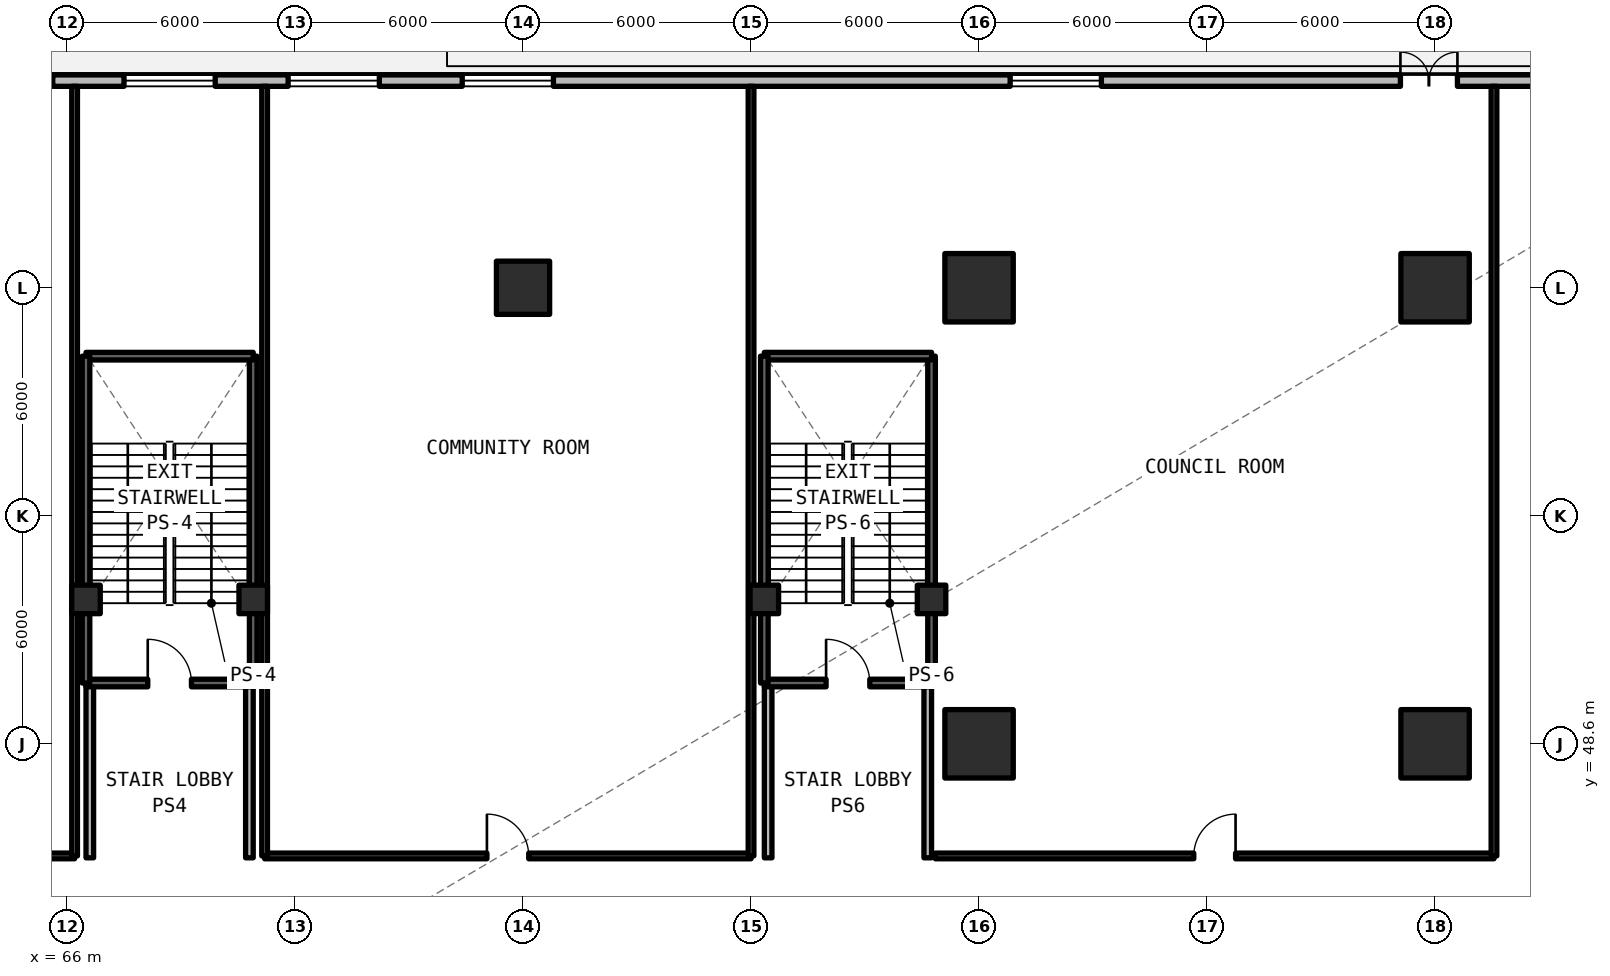
"""IFC4 building model, lengths in metres.
Left out: names, types, materials, properties, quantities, classifications, styles, units other than length and angle.
Written with IfcOpenShell. Run it as: python <this file> out.ifc"""

import sys

from ifc_helpers import new_model, si_unit, direction, frame, frame_2d, origin, origin_2d, place, context, subcontext, project, spatial, rectangle, circle, extrude, element, fill, save


model = new_model("IFC4")
c1 = context("Model", 3, precision=1e-05, world=origin(), true_north=direction((0.0, 1.0)))
c2 = subcontext(c1, "Body", "Model", "MODEL_VIEW")
j1 = project(units=[si_unit("LENGTHUNIT", "METRE"), si_unit("PLANEANGLEUNIT", "RADIAN")], contexts=[c1])
p1 = place(None, origin())
s1 = spatial("IfcSite", under=j1, at=p1, CompositionType="ELEMENT")
p2 = place(p1, origin())
s2 = spatial("IfcBuilding", under=s1, at=p2, CompositionType="ELEMENT")
p3 = place(p2, frame((0.0, 0.0, 4.95)))
s3 = spatial("IfcBuildingStorey", under=s2, at=p3, CompositionType="ELEMENT", Elevation=4.95)
p4 = place(p3, frame((78.0, 60.6, 0.0), z_axis=(0.0, 0.0, 1.0), x_axis=(1.0, 0.0, 0.0)))
e1 = element("IfcColumn", 1, at=p4, inside=s3, PredefinedType="COLUMN", context=c2, shape_type="SweptSolid", body=[
    extrude(circle(Radius=0.7, at=origin_2d()), origin(), (0.0, 0.0, 1.0), 4.95),
])
for number, where, z_axis, x_axis in (
    (2, (90.0, 60.6, 0.0), (0.0, 0.0, 1.0), (1.0, 0.0, 0.0)),
    (3, (102.0, 60.6, 0.0), (0.0, 0.0, 1.0), (1.0, 0.0, 0.0)),
    (4, (90.0, 48.6, 0.0), (0.0, 0.0, 1.0), (1.0, 0.0, 0.0)),
    (5, (102.0, 48.6, 0.0), (0.0, 0.0, 1.0), (1.0, 0.0, 0.0)),
):
    element("IfcColumn", number, at=place(p3, frame(where, z_axis=z_axis, x_axis=x_axis)), inside=s3, PredefinedType="COLUMN", context=c2, shape_type="SweptSolid", body=[
        extrude(rectangle(XDim=1.8, YDim=1.8, at=origin_2d()), origin(), (0.0, 0.0, 1.0), 4.95),
    ])
for number, where, z_axis, x_axis in (
    (6, (66.5, 52.4, 0.0), (0.0, 0.0, 1.0), (1.0, 0.0, 0.0)),
    (7, (70.9, 52.4, 0.0), (0.0, 0.0, 1.0), (1.0, 0.0, 0.0)),
    (8, (84.35, 52.4, 0.0), (0.0, 0.0, 1.0), (1.0, 0.0, 0.0)),
    (9, (88.75, 52.4, 0.0), (0.0, 0.0, 1.0), (1.0, 0.0, 0.0)),
):
    element("IfcColumn", number, at=place(p3, frame(where, z_axis=z_axis, x_axis=x_axis)), inside=s3, PredefinedType="COLUMN", context=c2, shape_type="SweptSolid", body=[
        extrude(rectangle(XDim=0.75, YDim=0.75, at=origin_2d()), origin(), (0.0, 0.0, 1.0), 4.95),
    ])
p5 = place(p3, frame((110.338, 66.05, 0.0), z_axis=(0.0, 0.0, 1.0), x_axis=(-1.0, 0.0, 0.0)))
e10 = element("IfcWall", 10, at=p5, inside=s3, PredefinedType="SOLIDWALL", context=c2, shape_type="SweptSolid", body=[
    extrude(rectangle(XDim=46.138, YDim=0.3, at=frame_2d((23.069, 0.0))), origin(), (0.0, 0.0, 1.0), 4.67),
])
p6 = place(p5, frame((7.75, 0.0, 0.0)))
e11 = element("IfcOpeningElement", 11, at=p6, cuts=e10, PredefinedType="OPENING", context=c2, shape_type="SweptSolid", body=[
    extrude(rectangle(XDim=1.5, YDim=2.2, at=frame_2d((0.75, 1.1))), frame((0.0, 0.16, 0.0), z_axis=(0.0, -1.0, 0.0), x_axis=(1.0, 0.0, 0.0)), (0.0, 0.0, 1.0), 0.32),
])
p7 = place(p5, frame((44.713, 0.0, 0.78)))
e12 = element("IfcOpeningElement", 12, at=p7, cuts=e10, PredefinedType="OPENING", context=c2, shape_type="SweptSolid", body=[
    extrude(rectangle(XDim=0.85, YDim=1.65, at=frame_2d((0.425, 0.825))), frame((0.0, 0.16, 0.0), z_axis=(0.0, -1.0, 0.0), x_axis=(1.0, 0.0, 0.0)), (0.0, 0.0, 1.0), 0.32),
])
p8 = place(p5, frame((31.538, 0.0, 0.78)))
e13 = element("IfcOpeningElement", 13, at=p8, cuts=e10, PredefinedType="OPENING", context=c2, shape_type="SweptSolid", body=[
    extrude(rectangle(XDim=2.4, YDim=1.66, at=frame_2d((1.2, 0.83))), frame((0.0, 0.16, 0.0), z_axis=(0.0, -1.0, 0.0), x_axis=(1.0, 0.0, 0.0)), (0.0, 0.0, 1.0), 0.32),
])
p9 = place(p5, frame((2.194, 0.0, 0.78)))
e14 = element("IfcOpeningElement", 14, at=p9, cuts=e10, PredefinedType="OPENING", context=c2, shape_type="SweptSolid", body=[
    extrude(rectangle(XDim=2.4, YDim=1.66, at=frame_2d((1.2, 0.83))), frame((0.0, 0.16, 0.0), z_axis=(0.0, -1.0, 0.0), x_axis=(1.0, 0.0, 0.0)), (0.0, 0.0, 1.0), 0.32),
])
p10 = place(p5, frame((40.438, 0.0, 0.78)))
e15 = element("IfcOpeningElement", 15, at=p10, cuts=e10, PredefinedType="OPENING", context=c2, shape_type="SweptSolid", body=[
    extrude(rectangle(XDim=2.4, YDim=1.66, at=frame_2d((1.2, 0.83))), frame((0.0, 0.16, 0.0), z_axis=(0.0, -1.0, 0.0), x_axis=(1.0, 0.0, 0.0)), (0.0, 0.0, 1.0), 0.32),
])
p11 = place(p5, frame((17.119, 0.0, 0.78)))
e16 = element("IfcOpeningElement", 16, at=p11, cuts=e10, PredefinedType="OPENING", context=c2, shape_type="SweptSolid", body=[
    extrude(rectangle(XDim=2.4, YDim=1.66, at=frame_2d((1.2, 0.83))), frame((0.0, 0.16, 0.0), z_axis=(0.0, -1.0, 0.0), x_axis=(1.0, 0.0, 0.0)), (0.0, 0.0, 1.0), 0.32),
])
p12 = place(p5, frame((36.119, 0.0, 0.78)))
e17 = element("IfcOpeningElement", 17, at=p12, cuts=e10, PredefinedType="OPENING", context=c2, shape_type="SweptSolid", body=[
    extrude(rectangle(XDim=2.4, YDim=1.66, at=frame_2d((1.2, 0.83))), frame((0.0, 0.16, 0.0), z_axis=(0.0, -1.0, 0.0), x_axis=(1.0, 0.0, 0.0)), (0.0, 0.0, 1.0), 0.32),
])
for number, where, z_axis, x_axis in (
    (18, (66.6, 45.6, 0.0), (0.0, 0.0, 1.0), (0.0, 1.0, 0.0)),
    (19, (70.8, 45.6, 0.0), (0.0, 0.0, 1.0), (0.0, 1.0, 0.0)),
    (20, (84.45, 45.6, 0.0), (0.0, 0.0, 1.0), (0.0, 1.0, 0.0)),
    (21, (88.65, 45.6, 0.0), (0.0, 0.0, 1.0), (0.0, 1.0, 0.0)),
):
    element("IfcWall", number, at=place(p3, frame(where, z_axis=z_axis, x_axis=x_axis)), inside=s3, PredefinedType="SOLIDWALL", context=c2, shape_type="SweptSolid", body=[
        extrude(rectangle(XDim=4.6, YDim=0.2, at=frame_2d((2.3, 0.0))), origin(), (0.0, 0.0, 1.0), 3.89),
    ])
p13 = place(p3, frame((30.2, 45.65, 0.0), z_axis=(0.0, 0.0, 1.0), x_axis=(1.0, 0.0, 0.0)))
e22 = element("IfcWall", 22, at=p13, inside=s3, PredefinedType="SOLIDWALL", context=c2, shape_type="SweptSolid", body=[
    extrude(rectangle(XDim=36.0, YDim=0.15, at=frame_2d((18.0, 0.0))), origin(), (0.0, 0.0, 1.0), 3.89),
])
p14 = place(p13, frame((17.3, 0.0, 0.0)))
e23 = element("IfcOpeningElement", 23, at=p14, cuts=e22, PredefinedType="OPENING", context=c2, shape_type="SweptSolid", body=[
    extrude(rectangle(XDim=1.4, YDim=2.15, at=frame_2d((0.7, 1.075))), frame((0.0, 0.085, 0.0), z_axis=(0.0, -1.0, 0.0), x_axis=(1.0, 0.0, 0.0)), (0.0, 0.0, 1.0), 0.17),
])
p15 = place(p3, frame((66.2, 45.65, 0.0), z_axis=(0.0, 0.0, 1.0), x_axis=(0.0, 1.0, 0.0)))
e24 = element("IfcWall", 24, at=p15, inside=s3, PredefinedType="SOLIDWALL", context=c2, shape_type="SweptSolid", body=[
    extrude(rectangle(XDim=20.25, YDim=0.15, at=frame_2d((10.125, 0.0))), origin(), (0.0, 0.0, 1.0), 3.89),
])
p16 = place(p3, frame((71.2, 45.65, 0.0), z_axis=(0.0, 0.0, 1.0), x_axis=(1.0, 0.0, 0.0)))
e25 = element("IfcWall", 25, at=p16, inside=s3, PredefinedType="SOLIDWALL", context=c2, shape_type="SweptSolid", body=[
    extrude(rectangle(XDim=12.8, YDim=0.15, at=frame_2d((6.4, 0.0))), origin(), (0.0, 0.0, 1.0), 3.89),
])
p17 = place(p16, frame((5.85, 0.0, 0.0)))
e26 = element("IfcOpeningElement", 26, at=p17, cuts=e25, PredefinedType="OPENING", context=c2, shape_type="SweptSolid", body=[
    extrude(rectangle(XDim=1.1, YDim=2.15, at=frame_2d((0.55, 1.075))), frame((0.0, 0.085, 0.0), z_axis=(0.0, -1.0, 0.0), x_axis=(1.0, 0.0, 0.0)), (0.0, 0.0, 1.0), 0.17),
])
for number, where, z_axis, x_axis in (
    (27, (71.2, 45.65, 0.0), (0.0, 0.0, 1.0), (0.0, 1.0, 0.0)),
    (28, (84.0, 45.65, 0.0), (0.0, 0.0, 1.0), (0.0, 1.0, 0.0)),
):
    element("IfcWall", number, at=place(p3, frame(where, z_axis=z_axis, x_axis=x_axis)), inside=s3, PredefinedType="SOLIDWALL", context=c2, shape_type="SweptSolid", body=[
        extrude(rectangle(XDim=20.25, YDim=0.15, at=frame_2d((10.125, 0.0))), origin(), (0.0, 0.0, 1.0), 3.89),
    ])
p18 = place(p3, frame((88.85, 45.65, 0.0), z_axis=(0.0, 0.0, 1.0), x_axis=(1.0, 0.0, 0.0)))
e29 = element("IfcWall", 29, at=p18, inside=s3, PredefinedType="SOLIDWALL", context=c2, shape_type="SweptSolid", body=[
    extrude(rectangle(XDim=14.7, YDim=0.15, at=frame_2d((7.35, 0.0))), origin(), (0.0, 0.0, 1.0), 3.89),
])
p19 = place(p18, frame((6.8, 0.0, 0.0)))
e30 = element("IfcOpeningElement", 30, at=p19, cuts=e29, PredefinedType="OPENING", context=c2, shape_type="SweptSolid", body=[
    extrude(rectangle(XDim=1.1, YDim=2.15, at=frame_2d((0.55, 1.075))), frame((0.0, 0.085, 0.0), z_axis=(0.0, -1.0, 0.0), x_axis=(1.0, 0.0, 0.0)), (0.0, 0.0, 1.0), 0.17),
])
p20 = place(p3, frame((103.55, 45.65, 0.0), z_axis=(0.0, 0.0, 1.0), x_axis=(0.0, 1.0, 0.0)))
e31 = element("IfcWall", 31, at=p20, inside=s3, PredefinedType="SOLIDWALL", context=c2, shape_type="SweptSolid", body=[
    extrude(rectangle(XDim=20.25, YDim=0.15, at=frame_2d((10.125, 0.0))), origin(), (0.0, 0.0, 1.0), 3.89),
])
p21 = place(p3, frame((66.5, 50.2, 0.0), z_axis=(0.0, 0.0, 1.0), x_axis=(1.0, 0.0, 0.0)))
e32 = element("IfcWall", 32, at=p21, inside=s3, PredefinedType="SOLIDWALL", context=c2, shape_type="SweptSolid", body=[
    extrude(rectangle(XDim=4.4, YDim=0.2, at=frame_2d((2.2, 0.0))), origin(), (0.0, 0.0, 1.0), 4.95),
])
p22 = place(p21, frame((1.625, 0.0, 0.0)))
e33 = element("IfcOpeningElement", 33, at=p22, cuts=e32, PredefinedType="OPENING", context=c2, shape_type="SweptSolid", body=[
    extrude(rectangle(XDim=1.15, YDim=2.15, at=frame_2d((0.575, 1.075))), frame((0.0, 0.11, 0.0), z_axis=(0.0, -1.0, 0.0), x_axis=(1.0, 0.0, 0.0)), (0.0, 0.0, 1.0), 0.22),
])
p23 = place(p3, frame((70.9, 50.2, 0.0), z_axis=(0.0, 0.0, 1.0), x_axis=(0.0, 1.0, 0.0)))
e34 = element("IfcWall", 34, at=p23, inside=s3, PredefinedType="SOLIDWALL", context=c2, shape_type="SweptSolid", body=[
    extrude(rectangle(XDim=8.6, YDim=0.2, at=frame_2d((4.3, 0.0))), origin(), (0.0, 0.0, 1.0), 4.95),
])
p24 = place(p3, frame((70.9, 58.8, 0.0), z_axis=(0.0, 0.0, 1.0), x_axis=(-1.0, 0.0, 0.0)))
e35 = element("IfcWall", 35, at=p24, inside=s3, PredefinedType="SOLIDWALL", context=c2, shape_type="SweptSolid", body=[
    extrude(rectangle(XDim=4.4, YDim=0.2, at=frame_2d((2.2, 0.0))), origin(), (0.0, 0.0, 1.0), 4.95),
])
p25 = place(p3, frame((66.5, 58.8, 0.0), z_axis=(0.0, 0.0, 1.0), x_axis=(0.0, -1.0, 0.0)))
e36 = element("IfcWall", 36, at=p25, inside=s3, PredefinedType="SOLIDWALL", context=c2, shape_type="SweptSolid", body=[
    extrude(rectangle(XDim=8.6, YDim=0.2, at=frame_2d((4.3, 0.0))), origin(), (0.0, 0.0, 1.0), 4.95),
])
p26 = place(p3, frame((84.35, 50.2, 0.0), z_axis=(0.0, 0.0, 1.0), x_axis=(1.0, 0.0, 0.0)))
e37 = element("IfcWall", 37, at=p26, inside=s3, PredefinedType="SOLIDWALL", context=c2, shape_type="SweptSolid", body=[
    extrude(rectangle(XDim=4.4, YDim=0.2, at=frame_2d((2.2, 0.0))), origin(), (0.0, 0.0, 1.0), 4.95),
])
p27 = place(p26, frame((1.625, 0.0, 0.0)))
e38 = element("IfcOpeningElement", 38, at=p27, cuts=e37, PredefinedType="OPENING", context=c2, shape_type="SweptSolid", body=[
    extrude(rectangle(XDim=1.15, YDim=2.15, at=frame_2d((0.575, 1.075))), frame((0.0, 0.11, 0.0), z_axis=(0.0, -1.0, 0.0), x_axis=(1.0, 0.0, 0.0)), (0.0, 0.0, 1.0), 0.22),
])
p28 = place(p3, frame((88.75, 50.2, 0.0), z_axis=(0.0, 0.0, 1.0), x_axis=(0.0, 1.0, 0.0)))
e39 = element("IfcWall", 39, at=p28, inside=s3, PredefinedType="SOLIDWALL", context=c2, shape_type="SweptSolid", body=[
    extrude(rectangle(XDim=8.6, YDim=0.2, at=frame_2d((4.3, 0.0))), origin(), (0.0, 0.0, 1.0), 4.95),
])
p29 = place(p3, frame((88.75, 58.8, 0.0), z_axis=(0.0, 0.0, 1.0), x_axis=(-1.0, 0.0, 0.0)))
e40 = element("IfcWall", 40, at=p29, inside=s3, PredefinedType="SOLIDWALL", context=c2, shape_type="SweptSolid", body=[
    extrude(rectangle(XDim=4.4, YDim=0.2, at=frame_2d((2.2, 0.0))), origin(), (0.0, 0.0, 1.0), 4.95),
])
p30 = place(p3, frame((84.35, 58.8, 0.0), z_axis=(0.0, 0.0, 1.0), x_axis=(0.0, -1.0, 0.0)))
e41 = element("IfcWall", 41, at=p30, inside=s3, PredefinedType="SOLIDWALL", context=c2, shape_type="SweptSolid", body=[
    extrude(rectangle(XDim=8.6, YDim=0.2, at=frame_2d((4.3, 0.0))), origin(), (0.0, 0.0, 1.0), 4.95),
])
p31 = place(p6, frame((1.5, 0.0, 0.0), z_axis=(0.0, 0.0, 1.0), x_axis=(-1.0, 0.0, 0.0)))
e42 = element("IfcDoor", 42, at=p31, inside=s3, OperationType="SINGLE_SWING_LEFT", PredefinedType="DOOR", context=c2, shape_type="SweptSolid", body=[
    extrude(rectangle(XDim=1.5, YDim=2.2, at=frame_2d((0.75, 1.1))), frame((0.0, 0.025, 0.0), z_axis=(0.0, -1.0, 0.0), x_axis=(1.0, 0.0, 0.0)), (0.0, 0.0, 1.0), 0.05),
])
fill(e11, e42)
p32 = place(p7, origin())
e43 = element("IfcWindow", 43, at=p32, inside=s3, PartitioningType="SINGLE_PANEL", PredefinedType="WINDOW", context=c2, shape_type="SweptSolid", body=[
    extrude(rectangle(XDim=0.85, YDim=1.65, at=frame_2d((0.425, 0.825))), frame((0.0, 0.03, 0.0), z_axis=(0.0, -1.0, 0.0), x_axis=(1.0, 0.0, 0.0)), (0.0, 0.0, 1.0), 0.06),
])
fill(e12, e43)
p33 = place(p8, origin())
e44 = element("IfcWindow", 44, at=p33, inside=s3, PartitioningType="SINGLE_PANEL", PredefinedType="WINDOW", context=c2, shape_type="SweptSolid", body=[
    extrude(rectangle(XDim=2.4, YDim=1.66, at=frame_2d((1.2, 0.83))), frame((0.0, 0.03, 0.0), z_axis=(0.0, -1.0, 0.0), x_axis=(1.0, 0.0, 0.0)), (0.0, 0.0, 1.0), 0.06),
])
fill(e13, e44)
p34 = place(p10, origin())
e45 = element("IfcWindow", 45, at=p34, inside=s3, PartitioningType="SINGLE_PANEL", PredefinedType="WINDOW", context=c2, shape_type="SweptSolid", body=[
    extrude(rectangle(XDim=2.4, YDim=1.66, at=frame_2d((1.2, 0.83))), frame((0.0, 0.03, 0.0), z_axis=(0.0, -1.0, 0.0), x_axis=(1.0, 0.0, 0.0)), (0.0, 0.0, 1.0), 0.06),
])
fill(e15, e45)
p35 = place(p11, origin())
e46 = element("IfcWindow", 46, at=p35, inside=s3, PartitioningType="SINGLE_PANEL", PredefinedType="WINDOW", context=c2, shape_type="SweptSolid", body=[
    extrude(rectangle(XDim=2.4, YDim=1.66, at=frame_2d((1.2, 0.83))), frame((0.0, 0.03, 0.0), z_axis=(0.0, -1.0, 0.0), x_axis=(1.0, 0.0, 0.0)), (0.0, 0.0, 1.0), 0.06),
])
fill(e16, e46)
p36 = place(p12, origin())
e47 = element("IfcWindow", 47, at=p36, inside=s3, PartitioningType="SINGLE_PANEL", PredefinedType="WINDOW", context=c2, shape_type="SweptSolid", body=[
    extrude(rectangle(XDim=2.4, YDim=1.66, at=frame_2d((1.2, 0.83))), frame((0.0, 0.03, 0.0), z_axis=(0.0, -1.0, 0.0), x_axis=(1.0, 0.0, 0.0)), (0.0, 0.0, 1.0), 0.06),
])
fill(e17, e47)
p37 = place(p17, origin())
e48 = element("IfcDoor", 48, at=p37, inside=s3, OperationType="SINGLE_SWING_LEFT", PredefinedType="DOOR", context=c2, shape_type="SweptSolid", body=[
    extrude(rectangle(XDim=1.1, YDim=2.15, at=frame_2d((0.55, 1.075))), frame((0.0, 0.025, 0.0), z_axis=(0.0, -1.0, 0.0), x_axis=(1.0, 0.0, 0.0)), (0.0, 0.0, 1.0), 0.05),
])
fill(e26, e48)
p38 = place(p19, origin())
e49 = element("IfcDoor", 49, at=p38, inside=s3, OperationType="SINGLE_SWING_RIGHT", PredefinedType="DOOR", context=c2, shape_type="SweptSolid", body=[
    extrude(rectangle(XDim=1.1, YDim=2.15, at=frame_2d((0.55, 1.075))), frame((0.0, 0.025, 0.0), z_axis=(0.0, -1.0, 0.0), x_axis=(1.0, 0.0, 0.0)), (0.0, 0.0, 1.0), 0.05),
])
fill(e30, e49)
p39 = place(p22, origin())
e50 = element("IfcDoor", 50, at=p39, inside=s3, OperationType="SINGLE_SWING_LEFT", PredefinedType="DOOR", context=c2, shape_type="SweptSolid", body=[
    extrude(rectangle(XDim=1.15, YDim=2.15, at=frame_2d((0.575, 1.075))), frame((0.0, 0.025, 0.0), z_axis=(0.0, -1.0, 0.0), x_axis=(1.0, 0.0, 0.0)), (0.0, 0.0, 1.0), 0.05),
])
fill(e33, e50)
p40 = place(p27, origin())
e51 = element("IfcDoor", 51, at=p40, inside=s3, OperationType="SINGLE_SWING_LEFT", PredefinedType="DOOR", context=c2, shape_type="SweptSolid", body=[
    extrude(rectangle(XDim=1.15, YDim=2.15, at=frame_2d((0.575, 1.075))), frame((0.0, 0.025, 0.0), z_axis=(0.0, -1.0, 0.0), x_axis=(1.0, 0.0, 0.0)), (0.0, 0.0, 1.0), 0.05),
])
fill(e38, e51)
save(model, sys.argv[1])
